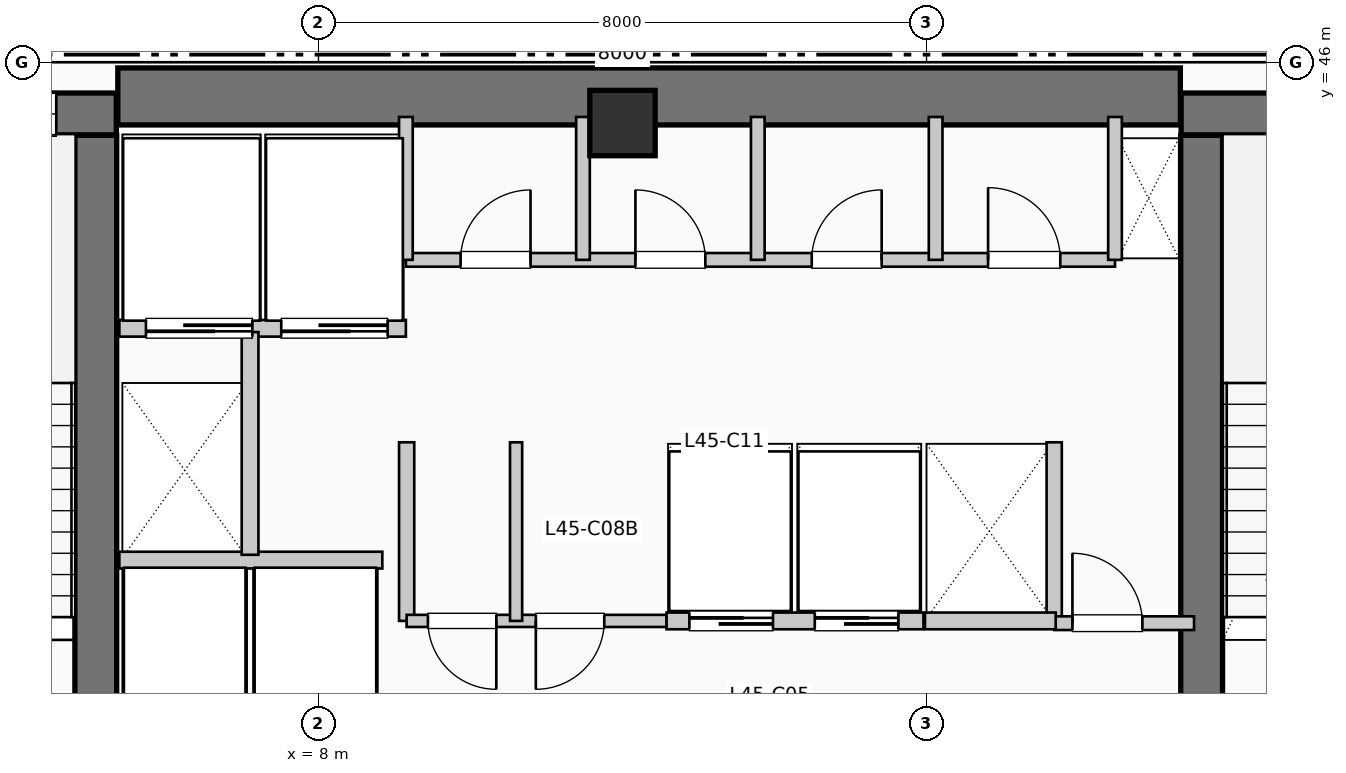
"""IFC4 building model, lengths in metres.
Left out: names, types, materials, properties, quantities, classifications, styles, units other than length and angle.
Written with IfcOpenShell. Run it as: python <this file> out.ifc"""

import sys

from ifc_helpers import new_model, si_unit, direction, frame, frame_2d, origin, origin_2d, place, context, subcontext, project, spatial, rectangle, extrude, element, fill, save


model = new_model("IFC4")
c1 = context("Model", 3, precision=1e-05, world=origin(), true_north=direction((0.0, 1.0)))
c2 = subcontext(c1, "Body", "Model", "MODEL_VIEW")
j1 = project(units=[si_unit("LENGTHUNIT", "METRE"), si_unit("PLANEANGLEUNIT", "RADIAN")], contexts=[c1])
p1 = place(None, origin())
s1 = spatial("IfcSite", under=j1, at=p1, CompositionType="ELEMENT")
p2 = place(p1, origin())
s2 = spatial("IfcBuilding", under=s1, at=p2, CompositionType="ELEMENT")
p3 = place(p2, frame((0.0, 0.0, 187.44)))
s3 = spatial("IfcBuildingStorey", under=s2, at=p3, CompositionType="ELEMENT", Elevation=187.44)
p4 = place(p3, frame((5.36, 45.55, 0.0), z_axis=(0.0, 0.0, 1.0), x_axis=(1.0, 0.0, 0.0)))
e1 = element("IfcWall", 1, at=p4, inside=s3, PredefinedType="SHEAR", context=c2, shape_type="SweptSolid", body=[
    extrude(rectangle(XDim=13.98, YDim=0.75, at=frame_2d((6.99, 0.0))), origin(), (0.0, 0.0, 1.0), 3.96),
])
p5 = place(p3, frame((5.07, 37.15, 0.0), z_axis=(0.0, 0.0, 1.0), x_axis=(0.0, 1.0, 0.0)))
e2 = element("IfcWall", 2, at=p5, inside=s3, PredefinedType="SHEAR", context=c2, shape_type="SweptSolid", body=[
    extrude(rectangle(XDim=7.89, YDim=0.55, at=frame_2d((3.945, 0.0))), origin(), (0.0, 0.0, 1.0), 3.96),
])
p6 = place(p3, frame((1.1, 45.32, 0.0), z_axis=(0.0, 0.0, 1.0), x_axis=(1.0, 0.0, 0.0)))
e3 = element("IfcWall", 3, at=p6, inside=s3, PredefinedType="SHEAR", context=c2, shape_type="SweptSolid", body=[
    extrude(rectangle(XDim=4.24, YDim=0.55, at=frame_2d((2.12, 0.0))), origin(), (0.0, 0.0, 1.0), 3.96),
])
p7 = place(p6, frame((2.05, 0.0, 1.05)))
e4 = element("IfcOpeningElement", 4, at=p7, cuts=e3, PredefinedType="OPENING", context=c2, shape_type="SweptSolid", body=[
    extrude(rectangle(XDim=1.4, YDim=1.8, at=frame_2d((0.7, 0.9))), frame((0.0, 0.285, 0.0), z_axis=(0.0, -1.0, 0.0), x_axis=(1.0, 0.0, 0.0)), (0.0, 0.0, 1.0), 0.57),
])
p8 = place(p3, frame((19.62, 37.15, 0.0), z_axis=(0.0, 0.0, 1.0), x_axis=(0.0, 1.0, 0.0)))
e5 = element("IfcWall", 5, at=p8, inside=s3, PredefinedType="SHEAR", context=c2, shape_type="SweptSolid", body=[
    extrude(rectangle(XDim=7.89, YDim=0.55, at=frame_2d((3.945, 0.0))), origin(), (0.0, 0.0, 1.0), 3.96),
])
p9 = place(p3, frame((19.35, 45.32, 0.0), z_axis=(0.0, 0.0, 1.0), x_axis=(1.0, 0.0, 0.0)))
e6 = element("IfcWall", 6, at=p9, inside=s3, PredefinedType="SHEAR", context=c2, shape_type="SweptSolid", body=[
    extrude(rectangle(XDim=3.69, YDim=0.55, at=frame_2d((1.845, 0.0))), origin(), (0.0, 0.0, 1.0), 3.96),
])
p10 = place(p9, frame((1.15, 0.0, 1.05)))
e7 = element("IfcOpeningElement", 7, at=p10, cuts=e6, PredefinedType="OPENING", context=c2, shape_type="SweptSolid", body=[
    extrude(rectangle(XDim=1.4, YDim=1.8, at=frame_2d((0.7, 0.9))), frame((0.0, 0.285, 0.0), z_axis=(0.0, -1.0, 0.0), x_axis=(1.0, 0.0, 0.0)), (0.0, 0.0, 1.0), 0.57),
])
p11 = place(p3, frame((12.0, 45.2, 0.0), z_axis=(0.0, 0.0, 1.0), x_axis=(1.0, 0.0, 0.0)))
e8 = element("IfcColumn", 8, at=p11, inside=s3, PredefinedType="COLUMN", context=c2, shape_type="SweptSolid", body=[
    extrude(rectangle(XDim=0.86, YDim=0.86, at=origin_2d()), origin(), (0.0, 0.0, 1.0), 3.96),
])
p12 = place(p3, frame((5.38, 39.45, 0.0), z_axis=(0.0, 0.0, 1.0), x_axis=(1.0, 0.0, 0.0)))
e9 = element("IfcWall", 9, at=p12, inside=s3, PredefinedType="PARTITIONING", context=c2, shape_type="SweptSolid", body=[
    extrude(rectangle(XDim=3.46, YDim=0.22, at=frame_2d((1.73, 0.0))), origin(), (0.0, 0.0, 1.0), 3.71),
])
p13 = place(p3, frame((5.38, 42.5, 0.0), z_axis=(0.0, 0.0, 1.0), x_axis=(1.0, 0.0, 0.0)))
e10 = element("IfcWall", 10, at=p13, inside=s3, PredefinedType="PARTITIONING", context=c2, shape_type="SweptSolid", body=[
    extrude(rectangle(XDim=3.77, YDim=0.22, at=frame_2d((1.885, 0.0))), origin(), (0.0, 0.0, 1.0), 3.71),
])
p14 = place(p13, frame((1.75, 0.0, 0.0), z_axis=(0.0, 0.0, 1.0), x_axis=(-1.0, 0.0, 0.0)))
e11 = element("IfcOpeningElement", 11, at=p14, cuts=e10, PredefinedType="OPENING", context=c2, shape_type="SweptSolid", body=[
    extrude(rectangle(XDim=1.4, YDim=2.2, at=frame_2d((0.7, 1.1))), frame((0.0, 0.12, 0.0), z_axis=(0.0, -1.0, 0.0), x_axis=(1.0, 0.0, 0.0)), (0.0, 0.0, 1.0), 0.24),
])
p15 = place(p13, frame((3.53, 0.0, 0.0), z_axis=(0.0, 0.0, 1.0), x_axis=(-1.0, 0.0, 0.0)))
e12 = element("IfcOpeningElement", 12, at=p15, cuts=e10, PredefinedType="OPENING", context=c2, shape_type="SweptSolid", body=[
    extrude(rectangle(XDim=1.4, YDim=2.2, at=frame_2d((0.7, 1.1))), frame((0.0, 0.12, 0.0), z_axis=(0.0, -1.0, 0.0), x_axis=(1.0, 0.0, 0.0)), (0.0, 0.0, 1.0), 0.24),
])
p16 = place(p3, frame((7.1, 39.52, 0.0), z_axis=(0.0, 0.0, 1.0), x_axis=(0.0, 1.0, 0.0)))
e13 = element("IfcWall", 13, at=p16, inside=s3, PredefinedType="PARTITIONING", context=c2, shape_type="SweptSolid", body=[
    extrude(rectangle(XDim=2.93, YDim=0.22, at=frame_2d((1.465, 0.0))), origin(), (0.0, 0.0, 1.0), 3.71),
])
for number, where, z_axis, x_axis in (
    (14, (9.16, 38.65, 0.0), (0.0, 0.0, 1.0), (0.0, 1.0, 0.0)),
    (15, (17.68, 38.65, 0.0), (0.0, 0.0, 1.0), (0.0, 1.0, 0.0)),
):
    element("IfcWall", number, at=place(p3, frame(where, z_axis=z_axis, x_axis=x_axis)), inside=s3, PredefinedType="PARTITIONING", context=c2, shape_type="SweptSolid", body=[
        extrude(rectangle(XDim=2.35, YDim=0.2, at=frame_2d((1.175, 0.0))), origin(), (0.0, 0.0, 1.0), 3.71),
    ])
p17 = place(p3, frame((17.68, 38.62, 0.0), z_axis=(0.0, 0.0, 1.0), x_axis=(1.0, 0.0, 0.0)))
e16 = element("IfcWall", 16, at=p17, inside=s3, PredefinedType="PARTITIONING", context=c2, shape_type="SweptSolid", body=[
    extrude(rectangle(XDim=1.84, YDim=0.18, at=frame_2d((0.92, 0.0))), origin(), (0.0, 0.0, 1.0), 3.71),
])
p18 = place(p17, frame((0.24, 0.0, 0.0)))
e17 = element("IfcOpeningElement", 17, at=p18, cuts=e16, PredefinedType="OPENING", context=c2, shape_type="SweptSolid", body=[
    extrude(rectangle(XDim=0.92, YDim=2.1, at=frame_2d((0.46, 1.05))), frame((0.0, 0.1, 0.0), z_axis=(0.0, -1.0, 0.0), x_axis=(1.0, 0.0, 0.0)), (0.0, 0.0, 1.0), 0.2),
])
p19 = place(p3, frame((9.16, 38.65, 0.0), z_axis=(0.0, 0.0, 1.0), x_axis=(1.0, 0.0, 0.0)))
e18 = element("IfcWall", 18, at=p19, inside=s3, PredefinedType="PARTITIONING", context=c2, shape_type="SweptSolid", body=[
    extrude(rectangle(XDim=3.42, YDim=0.16, at=frame_2d((1.71, 0.0))), origin(), (0.0, 0.0, 1.0), 3.71),
])
p20 = place(p19, frame((1.18, 0.0, 0.0), z_axis=(0.0, 0.0, 1.0), x_axis=(-1.0, 0.0, 0.0)))
e19 = element("IfcOpeningElement", 19, at=p20, cuts=e18, PredefinedType="OPENING", context=c2, shape_type="SweptSolid", body=[
    extrude(rectangle(XDim=0.9, YDim=2.15, at=frame_2d((0.45, 1.075))), frame((0.0, 0.09, 0.0), z_axis=(0.0, -1.0, 0.0), x_axis=(1.0, 0.0, 0.0)), (0.0, 0.0, 1.0), 0.18),
])
p21 = place(p19, frame((2.6, 0.0, 0.0), z_axis=(0.0, 0.0, 1.0), x_axis=(-1.0, 0.0, 0.0)))
e20 = element("IfcOpeningElement", 20, at=p21, cuts=e18, PredefinedType="OPENING", context=c2, shape_type="SweptSolid", body=[
    extrude(rectangle(XDim=0.9, YDim=2.15, at=frame_2d((0.45, 1.075))), frame((0.0, 0.09, 0.0), z_axis=(0.0, -1.0, 0.0), x_axis=(1.0, 0.0, 0.0)), (0.0, 0.0, 1.0), 0.18),
])
p22 = place(p3, frame((10.6, 38.65, 0.0), z_axis=(0.0, 0.0, 1.0), x_axis=(0.0, 1.0, 0.0)))
e21 = element("IfcWall", 21, at=p22, inside=s3, PredefinedType="PARTITIONING", context=c2, shape_type="SweptSolid", body=[
    extrude(rectangle(XDim=2.35, YDim=0.16, at=frame_2d((1.175, 0.0))), origin(), (0.0, 0.0, 1.0), 3.71),
])
p23 = place(p3, frame((12.58, 38.65, 0.0), z_axis=(0.0, 0.0, 1.0), x_axis=(1.0, 0.0, 0.0)))
e22 = element("IfcWall", 22, at=p23, inside=s3, PredefinedType="PARTITIONING", context=c2, shape_type="SweptSolid", body=[
    extrude(rectangle(XDim=3.38, YDim=0.22, at=frame_2d((1.69, 0.0))), origin(), (0.0, 0.0, 1.0), 3.71),
])
p24 = place(p23, frame((0.3, 0.0, 0.0)))
e23 = element("IfcOpeningElement", 23, at=p24, cuts=e22, PredefinedType="OPENING", context=c2, shape_type="SweptSolid", body=[
    extrude(rectangle(XDim=1.1, YDim=2.2, at=frame_2d((0.55, 1.1))), frame((0.0, 0.12, 0.0), z_axis=(0.0, -1.0, 0.0), x_axis=(1.0, 0.0, 0.0)), (0.0, 0.0, 1.0), 0.24),
])
p25 = place(p23, frame((1.95, 0.0, 0.0)))
e24 = element("IfcOpeningElement", 24, at=p25, cuts=e22, PredefinedType="OPENING", context=c2, shape_type="SweptSolid", body=[
    extrude(rectangle(XDim=1.1, YDim=2.2, at=frame_2d((0.55, 1.1))), frame((0.0, 0.12, 0.0), z_axis=(0.0, -1.0, 0.0), x_axis=(1.0, 0.0, 0.0)), (0.0, 0.0, 1.0), 0.24),
])
p26 = place(p3, frame((15.98, 38.65, 0.0), z_axis=(0.0, 0.0, 1.0), x_axis=(1.0, 0.0, 0.0)))
e25 = element("IfcWall", 25, at=p26, inside=s3, PredefinedType="PARTITIONING", context=c2, shape_type="SweptSolid", body=[
    extrude(rectangle(XDim=1.72, YDim=0.22, at=frame_2d((0.86, 0.0))), origin(), (0.0, 0.0, 1.0), 3.71),
])
p27 = place(p3, frame((9.15, 43.4, 0.0), z_axis=(0.0, 0.0, 1.0), x_axis=(1.0, 0.0, 0.0)))
e26 = element("IfcWall", 26, at=p27, inside=s3, PredefinedType="PLUMBINGWALL", context=c2, shape_type="SweptSolid", body=[
    extrude(rectangle(XDim=9.33, YDim=0.18, at=frame_2d((4.665, 0.0))), origin(), (0.0, 0.0, 1.0), 3.71),
])
p28 = place(p27, frame((0.72, 0.0, 0.0)))
e27 = element("IfcOpeningElement", 27, at=p28, cuts=e26, PredefinedType="OPENING", context=c2, shape_type="SweptSolid", body=[
    extrude(rectangle(XDim=0.92, YDim=2.1, at=frame_2d((0.46, 1.05))), frame((0.0, 0.1, 0.0), z_axis=(0.0, -1.0, 0.0), x_axis=(1.0, 0.0, 0.0)), (0.0, 0.0, 1.0), 0.2),
])
p29 = place(p27, frame((3.02, 0.0, 0.0)))
e28 = element("IfcOpeningElement", 28, at=p29, cuts=e26, PredefinedType="OPENING", context=c2, shape_type="SweptSolid", body=[
    extrude(rectangle(XDim=0.92, YDim=2.1, at=frame_2d((0.46, 1.05))), frame((0.0, 0.1, 0.0), z_axis=(0.0, -1.0, 0.0), x_axis=(1.0, 0.0, 0.0)), (0.0, 0.0, 1.0), 0.2),
])
p30 = place(p27, frame((5.34, 0.0, 0.0)))
e29 = element("IfcOpeningElement", 29, at=p30, cuts=e26, PredefinedType="OPENING", context=c2, shape_type="SweptSolid", body=[
    extrude(rectangle(XDim=0.92, YDim=2.1, at=frame_2d((0.46, 1.05))), frame((0.0, 0.1, 0.0), z_axis=(0.0, -1.0, 0.0), x_axis=(1.0, 0.0, 0.0)), (0.0, 0.0, 1.0), 0.2),
])
p31 = place(p27, frame((7.66, 0.0, 0.0)))
e30 = element("IfcOpeningElement", 30, at=p31, cuts=e26, PredefinedType="OPENING", context=c2, shape_type="SweptSolid", body=[
    extrude(rectangle(XDim=0.95, YDim=2.1, at=frame_2d((0.475, 1.05))), frame((0.0, 0.1, 0.0), z_axis=(0.0, -1.0, 0.0), x_axis=(1.0, 0.0, 0.0)), (0.0, 0.0, 1.0), 0.2),
])
for number, where, z_axis, x_axis in (
    (31, (9.15, 43.4, 0.0), (0.0, 0.0, 1.0), (0.0, 1.0, 0.0)),
    (32, (18.48, 43.4, 0.0), (0.0, 0.0, 1.0), (0.0, 1.0, 0.0)),
    (33, (11.48, 43.4, 0.0), (0.0, 0.0, 1.0), (0.0, 1.0, 0.0)),
    (34, (13.78, 43.4, 0.0), (0.0, 0.0, 1.0), (0.0, 1.0, 0.0)),
    (35, (16.12, 43.4, 0.0), (0.0, 0.0, 1.0), (0.0, 1.0, 0.0)),
):
    element("IfcWall", number, at=place(p3, frame(where, z_axis=z_axis, x_axis=x_axis)), inside=s3, PredefinedType="PLUMBINGWALL", context=c2, shape_type="SweptSolid", body=[
        extrude(rectangle(XDim=1.88, YDim=0.18, at=frame_2d((0.94, 0.0))), origin(), (0.0, 0.0, 1.0), 3.71),
    ])
p32 = place(p7, origin())
e36 = element("IfcWindow", 36, at=p32, inside=s3, PartitioningType="SINGLE_PANEL", PredefinedType="WINDOW", context=c2, shape_type="SweptSolid", body=[
    extrude(rectangle(XDim=1.4, YDim=1.8, at=frame_2d((0.7, 0.9))), frame((0.0, 0.03, 0.0), z_axis=(0.0, -1.0, 0.0), x_axis=(1.0, 0.0, 0.0)), (0.0, 0.0, 1.0), 0.06),
])
fill(e4, e36)
p33 = place(p14, origin())
e37 = element("IfcDoor", 37, at=p33, inside=s3, OperationType="SLIDING_TO_LEFT", PredefinedType="DOOR", context=c2, shape_type="SweptSolid", body=[
    extrude(rectangle(XDim=1.4, YDim=2.2, at=frame_2d((0.7, 1.1))), frame((0.0, 0.025, 0.0), z_axis=(0.0, -1.0, 0.0), x_axis=(1.0, 0.0, 0.0)), (0.0, 0.0, 1.0), 0.05),
])
fill(e11, e37)
p34 = place(p15, origin())
e38 = element("IfcDoor", 38, at=p34, inside=s3, OperationType="SLIDING_TO_LEFT", PredefinedType="DOOR", context=c2, shape_type="SweptSolid", body=[
    extrude(rectangle(XDim=1.4, YDim=2.2, at=frame_2d((0.7, 1.1))), frame((0.0, 0.025, 0.0), z_axis=(0.0, -1.0, 0.0), x_axis=(1.0, 0.0, 0.0)), (0.0, 0.0, 1.0), 0.05),
])
fill(e12, e38)
p35 = place(p18, origin())
e39 = element("IfcDoor", 39, at=p35, inside=s3, OperationType="SINGLE_SWING_LEFT", PredefinedType="DOOR", context=c2, shape_type="SweptSolid", body=[
    extrude(rectangle(XDim=0.92, YDim=2.1, at=frame_2d((0.46, 1.05))), frame((0.0, 0.025, 0.0), z_axis=(0.0, -1.0, 0.0), x_axis=(1.0, 0.0, 0.0)), (0.0, 0.0, 1.0), 0.05),
])
fill(e17, e39)
p36 = place(p20, origin())
e40 = element("IfcDoor", 40, at=p36, inside=s3, OperationType="SINGLE_SWING_RIGHT", PredefinedType="DOOR", context=c2, shape_type="SweptSolid", body=[
    extrude(rectangle(XDim=0.9, YDim=2.15, at=frame_2d((0.45, 1.075))), frame((0.0, 0.025, 0.0), z_axis=(0.0, -1.0, 0.0), x_axis=(1.0, 0.0, 0.0)), (0.0, 0.0, 1.0), 0.05),
])
fill(e19, e40)
p37 = place(p21, origin())
e41 = element("IfcDoor", 41, at=p37, inside=s3, OperationType="SINGLE_SWING_LEFT", PredefinedType="DOOR", context=c2, shape_type="SweptSolid", body=[
    extrude(rectangle(XDim=0.9, YDim=2.15, at=frame_2d((0.45, 1.075))), frame((0.0, 0.025, 0.0), z_axis=(0.0, -1.0, 0.0), x_axis=(1.0, 0.0, 0.0)), (0.0, 0.0, 1.0), 0.05),
])
fill(e20, e41)
p38 = place(p24, origin())
e42 = element("IfcDoor", 42, at=p38, inside=s3, OperationType="SLIDING_TO_RIGHT", PredefinedType="DOOR", context=c2, shape_type="SweptSolid", body=[
    extrude(rectangle(XDim=1.1, YDim=2.2, at=frame_2d((0.55, 1.1))), frame((0.0, 0.025, 0.0), z_axis=(0.0, -1.0, 0.0), x_axis=(1.0, 0.0, 0.0)), (0.0, 0.0, 1.0), 0.05),
])
fill(e23, e42)
p39 = place(p25, origin())
e43 = element("IfcDoor", 43, at=p39, inside=s3, OperationType="SLIDING_TO_RIGHT", PredefinedType="DOOR", context=c2, shape_type="SweptSolid", body=[
    extrude(rectangle(XDim=1.1, YDim=2.2, at=frame_2d((0.55, 1.1))), frame((0.0, 0.025, 0.0), z_axis=(0.0, -1.0, 0.0), x_axis=(1.0, 0.0, 0.0)), (0.0, 0.0, 1.0), 0.05),
])
fill(e24, e43)
p40 = place(p28, origin())
e44 = element("IfcDoor", 44, at=p40, inside=s3, OperationType="SINGLE_SWING_RIGHT", PredefinedType="DOOR", context=c2, shape_type="SweptSolid", body=[
    extrude(rectangle(XDim=0.92, YDim=2.1, at=frame_2d((0.46, 1.05))), frame((0.0, 0.025, 0.0), z_axis=(0.0, -1.0, 0.0), x_axis=(1.0, 0.0, 0.0)), (0.0, 0.0, 1.0), 0.05),
])
fill(e27, e44)
p41 = place(p29, origin())
e45 = element("IfcDoor", 45, at=p41, inside=s3, OperationType="SINGLE_SWING_LEFT", PredefinedType="DOOR", context=c2, shape_type="SweptSolid", body=[
    extrude(rectangle(XDim=0.92, YDim=2.1, at=frame_2d((0.46, 1.05))), frame((0.0, 0.025, 0.0), z_axis=(0.0, -1.0, 0.0), x_axis=(1.0, 0.0, 0.0)), (0.0, 0.0, 1.0), 0.05),
])
fill(e28, e45)
p42 = place(p30, origin())
e46 = element("IfcDoor", 46, at=p42, inside=s3, OperationType="SINGLE_SWING_RIGHT", PredefinedType="DOOR", context=c2, shape_type="SweptSolid", body=[
    extrude(rectangle(XDim=0.92, YDim=2.1, at=frame_2d((0.46, 1.05))), frame((0.0, 0.025, 0.0), z_axis=(0.0, -1.0, 0.0), x_axis=(1.0, 0.0, 0.0)), (0.0, 0.0, 1.0), 0.05),
])
fill(e29, e46)
p43 = place(p31, origin())
e47 = element("IfcDoor", 47, at=p43, inside=s3, OperationType="SINGLE_SWING_LEFT", PredefinedType="DOOR", context=c2, shape_type="SweptSolid", body=[
    extrude(rectangle(XDim=0.95, YDim=2.1, at=frame_2d((0.475, 1.05))), frame((0.0, 0.025, 0.0), z_axis=(0.0, -1.0, 0.0), x_axis=(1.0, 0.0, 0.0)), (0.0, 0.0, 1.0), 0.05),
])
fill(e30, e47)
save(model, sys.argv[1])
